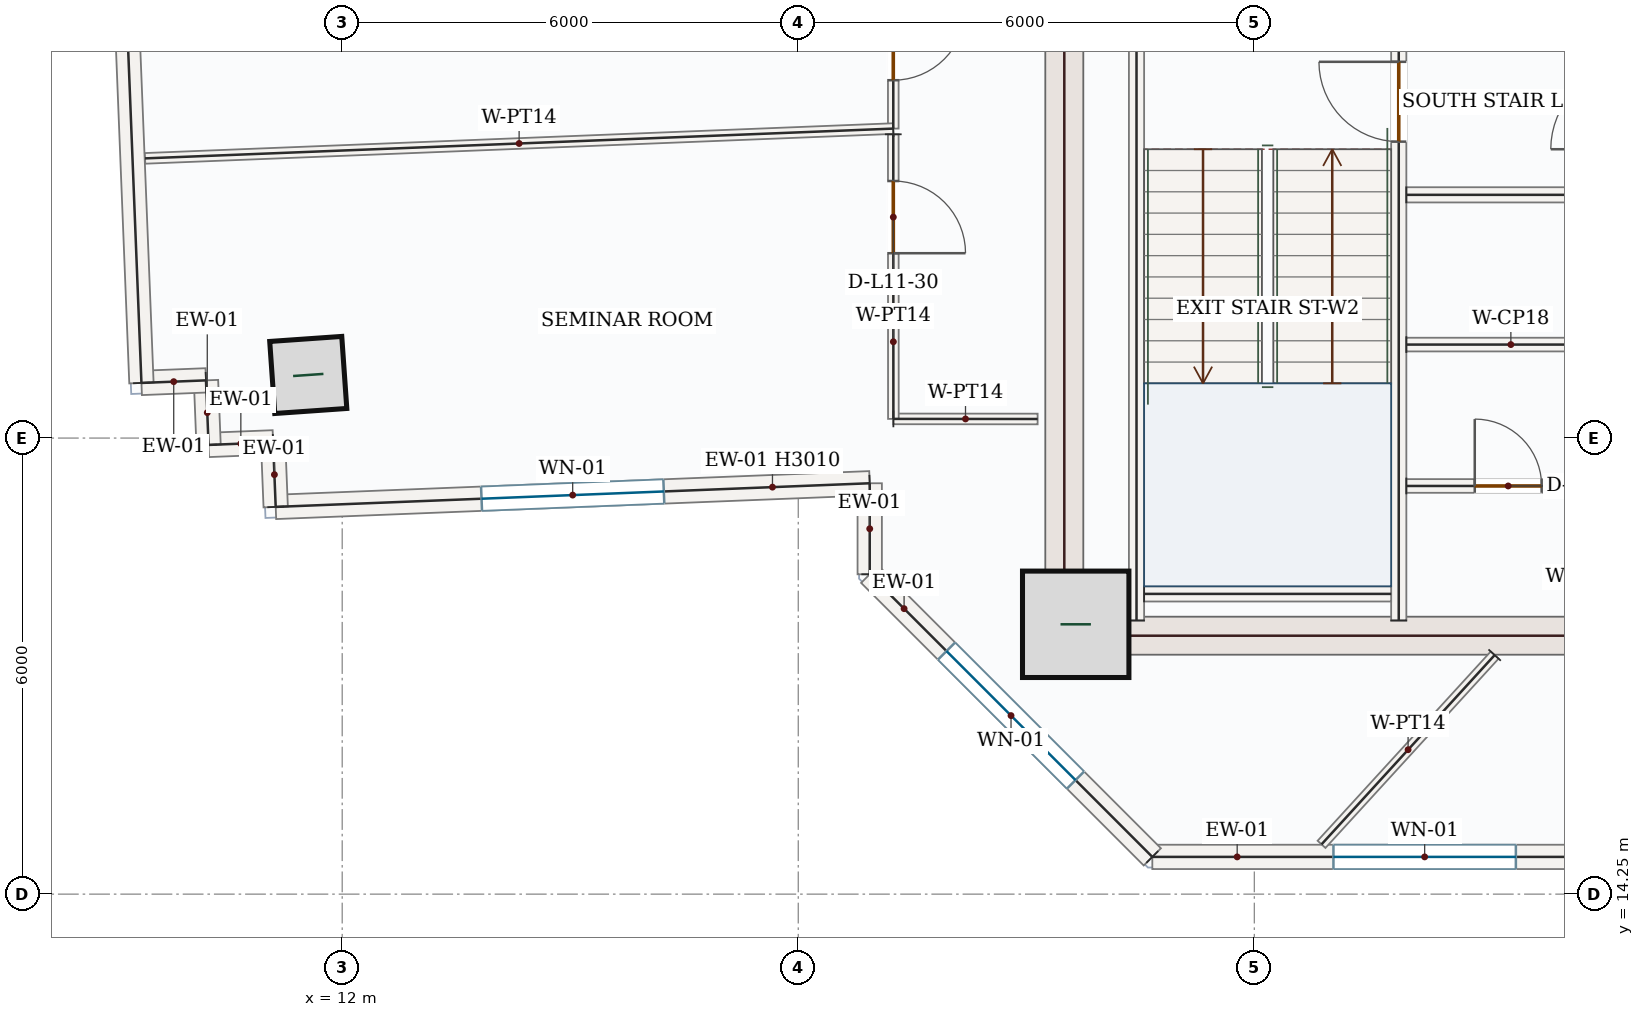
"""IFC4 building model, lengths in metres.
Left out: names, types, materials, properties, quantities, classifications, styles, units other than length and angle.
Written with IfcOpenShell. Run it as: python <this file> out.ifc"""

import sys

from ifc_helpers import new_model, si_unit, direction, frame, frame_2d, origin, origin_2d, place, context, subcontext, project, spatial, rectangle, hollow_rectangle, extrude, source, transform, mapped, element, fill, save


model = new_model("IFC4")
c1 = context("Model", 3, precision=1e-05, world=origin(), true_north=direction((0.0, 1.0)))
c2 = subcontext(c1, "Body", "Model", "MODEL_VIEW")
j1 = project(units=[si_unit("LENGTHUNIT", "METRE"), si_unit("PLANEANGLEUNIT", "RADIAN")], contexts=[c1])
p1 = place(None, origin())
s1 = spatial("IfcSite", under=j1, at=p1, CompositionType="ELEMENT")
p2 = place(p1, origin())
s2 = spatial("IfcBuilding", under=s1, at=p2, CompositionType="ELEMENT")
p3 = place(p2, frame((0.0, 0.0, 54.3)))
s3 = spatial("IfcBuildingStorey", under=s2, at=p3, CompositionType="ELEMENT", Elevation=54.3)
m1 = source(origin(), c2, "Body", "SweptSolid", [
    extrude(rectangle(XDim=8.55, YDim=0.5, at=frame_2d((4.275, 0.0))), origin(), (0.0, 0.0, 1.0), 3.95),
])
p4 = place(p3, frame((21.5, 17.4, 0.0), z_axis=(0.0, 0.0, 1.0), x_axis=(0.0, 1.0, 0.0)))
e1 = element("IfcWall", 1, at=p4, inside=s3, PredefinedType="SHEAR", context=c2, shape_type="MappedRepresentation", body=[
    mapped(m1, transform((0.0, 0.0, 0.0), x_axis=(1.0, 0.0, 0.0), y_axis=(0.0, 1.0, 0.0), z_axis=(0.0, 0.0, 1.0), scale=1.0)),
])
m2 = source(origin(), c2, "Body", "SweptSolid", [
    extrude(rectangle(XDim=7.0, YDim=0.5, at=frame_2d((3.5, 0.0))), origin(), (0.0, 0.0, 1.0), 3.95),
])
p5 = place(p3, frame((21.75, 17.65, 0.0), z_axis=(0.0, 0.0, 1.0), x_axis=(1.0, 0.0, 0.0)))
e2 = element("IfcWall", 2, at=p5, inside=s3, PredefinedType="SHEAR", context=c2, shape_type="MappedRepresentation", body=[
    mapped(m2, transform((0.0, 0.0, 0.0), x_axis=(1.0, 0.0, 0.0), y_axis=(0.0, 1.0, 0.0), z_axis=(0.0, 0.0, 1.0), scale=1.0)),
])
m3 = source(origin(), c2, "Body", "SweptSolid", [
    extrude(rectangle(XDim=1.4, YDim=1.4, at=origin_2d()), origin(), (0.0, 0.0, 1.0), 4.2),
])
p6 = place(p3, frame((21.65, 17.8, 0.0), z_axis=(0.0, 0.0, 1.0), x_axis=(1.0, 0.0, 0.0)))
e3 = element("IfcColumn", 3, at=p6, inside=s3, PredefinedType="COLUMN", context=c2, shape_type="MappedRepresentation", body=[
    mapped(m3, transform((0.0, 0.0, 0.0), x_axis=(1.0, 0.0, 0.0), y_axis=(0.0, 1.0, 0.0), z_axis=(0.0, 0.0, 1.0), scale=1.0)),
])
m4 = source(origin(), c2, "Body", "SweptSolid", [
    extrude(hollow_rectangle(XDim=0.95, YDim=0.95, WallThickness=0.05, at=origin_2d()), origin(), (0.0, 0.0, 1.0), 4.2),
])
p7 = place(p3, frame((11.553, 21.08, 0.0), z_axis=(0.0, 0.0, 1.0), x_axis=(0.99756405026, 0.069756473744, 0.0)))
e4 = element("IfcColumn", 4, at=p7, inside=s3, PredefinedType="COLUMN", context=c2, shape_type="MappedRepresentation", body=[
    mapped(m4, transform((0.0, 0.0, 0.0), x_axis=(1.0, 0.0, 0.0), y_axis=(0.0, 1.0, 0.0), z_axis=(0.0, 0.0, 1.0), scale=1.0)),
])
p8 = place(p3, frame((29.823, 14.74, 0.0), z_axis=(0.0, 0.0, 1.0), x_axis=(-1.0, 0.0, 0.0)))
e5 = element("IfcWall", 5, at=p8, inside=s3, PredefinedType="SOLIDWALL", context=c2, shape_type="SweptSolid", body=[
    extrude(rectangle(XDim=7.165, YDim=0.32, at=frame_2d((3.583, 0.0))), origin(), (0.0, 0.0, 1.0), 3.95),
])
p9 = place(p8, frame((2.382, 0.0, 0.85)))
e6 = element("IfcOpeningElement", 6, at=p9, cuts=e5, PredefinedType="OPENING", context=c2, shape_type="SweptSolid", body=[
    extrude(rectangle(XDim=2.4, YDim=1.8, at=frame_2d((1.2, 0.9))), frame((0.0, 0.17, 0.0), z_axis=(0.0, -1.0, 0.0), x_axis=(1.0, 0.0, 0.0)), (0.0, 0.0, 1.0), 0.34),
])
p10 = place(p3, frame((22.658, 14.74, 0.0), z_axis=(0.0, 0.0, 1.0), x_axis=(-0.707106781187, 0.707106781187, 0.0)))
e7 = element("IfcWall", 7, at=p10, inside=s3, PredefinedType="SOLIDWALL", context=c2, shape_type="SweptSolid", body=[
    extrude(rectangle(XDim=5.258, YDim=0.32, at=frame_2d((2.629, 0.0))), origin(), (0.0, 0.0, 1.0), 3.95),
])
p11 = place(p10, frame((1.429, 0.0, 0.85)))
e8 = element("IfcOpeningElement", 8, at=p11, cuts=e7, PredefinedType="OPENING", context=c2, shape_type="SweptSolid", body=[
    extrude(rectangle(XDim=2.4, YDim=1.8, at=frame_2d((1.2, 0.9))), frame((0.0, 0.17, 0.0), z_axis=(0.0, -1.0, 0.0), x_axis=(1.0, 0.0, 0.0)), (0.0, 0.0, 1.0), 0.34),
])
m5 = source(origin(), c2, "Body", "SweptSolid", [
    extrude(rectangle(XDim=1.198, YDim=0.32, at=frame_2d((0.599, 0.0))), origin(), (0.0, 0.0, 1.0), 3.95),
])
p12 = place(p3, frame((18.94, 18.458, 0.0), z_axis=(0.0, 0.0, 1.0), x_axis=(0.0, 1.0, 0.0)))
e9 = element("IfcWall", 9, at=p12, inside=s3, PredefinedType="SOLIDWALL", context=c2, shape_type="MappedRepresentation", body=[
    mapped(m5, transform((0.0, 0.0, 0.0), x_axis=(1.0, 0.0, 0.0), y_axis=(0.0, 1.0, 0.0), z_axis=(0.0, 0.0, 1.0), scale=1.0)),
])
p13 = place(p3, frame((18.94, 19.656, 0.0), z_axis=(0.0, 0.0, 1.0), x_axis=(-0.999208917222, -0.039768577336, 0.0)))
e10 = element("IfcWall", 10, at=p13, inside=s3, PredefinedType="SOLIDWALL", context=c2, shape_type="SweptSolid", body=[
    extrude(rectangle(XDim=7.821, YDim=0.32, at=frame_2d((3.911, 0.0))), origin(), (0.0, 0.0, 1.0), 3.01),
])
p14 = place(p13, frame((2.711, 0.0, 0.85)))
e11 = element("IfcOpeningElement", 11, at=p14, cuts=e10, PredefinedType="OPENING", context=c2, shape_type="SweptSolid", body=[
    extrude(rectangle(XDim=2.4, YDim=1.8, at=frame_2d((1.2, 0.9))), frame((0.0, 0.17, 0.0), z_axis=(0.0, -1.0, 0.0), x_axis=(1.0, 0.0, 0.0)), (0.0, 0.0, 1.0), 0.34),
])
m6 = source(origin(), c2, "Body", "SweptSolid", [
    extrude(rectangle(XDim=0.85, YDim=0.32, at=frame_2d((0.425, 0.0))), origin(), (0.0, 0.0, 1.0), 3.95),
])
p15 = place(p3, frame((11.125, 19.344, 0.0), z_axis=(0.0, 0.0, 1.0), x_axis=(-0.039933618331, 0.999202334929, 0.0)))
e12 = element("IfcWall", 12, at=p15, inside=s3, PredefinedType="SOLIDWALL", context=c2, shape_type="MappedRepresentation", body=[
    mapped(m6, transform((0.0, 0.0, 0.0), x_axis=(1.0, 0.0, 0.0), y_axis=(0.0, 1.0, 0.0), z_axis=(0.0, 0.0, 1.0), scale=1.0)),
])
m7 = source(origin(), c2, "Body", "SweptSolid", [
    extrude(rectangle(XDim=0.85, YDim=0.32, at=frame_2d((0.425, 0.0))), origin(), (0.0, 0.0, 1.0), 3.95),
])
for number, where, z_axis, x_axis in (
    (13, (11.091, 20.194, 0.0), (0.0, 0.0, 1.0), (-0.999, -0.04, 0.0)),
    (14, (10.242, 20.16, 0.0), (0.0, 0.0, 1.0), (-0.04, 0.999, 0.0)),
    (15, (10.208, 21.009, 0.0), (0.0, 0.0, 1.0), (-0.999, -0.04, 0.0)),
):
    element("IfcWall", number, at=place(p3, frame(where, z_axis=z_axis, x_axis=x_axis)), inside=s3, PredefinedType="SOLIDWALL", context=c2, shape_type="MappedRepresentation", body=[
        mapped(m7, transform((0.0, 0.0, 0.0), x_axis=(1.0, 0.0, 0.0), y_axis=(0.0, 1.0, 0.0), z_axis=(0.0, 0.0, 1.0), scale=1.0)),
    ])
m8 = source(origin(), c2, "Body", "SweptSolid", [
    extrude(rectangle(XDim=9.92, YDim=0.32, at=frame_2d((4.96, 0.0))), origin(), (0.0, 0.0, 1.0), 3.95),
])
p16 = place(p3, frame((9.359, 20.975, 0.0), z_axis=(0.0, 0.0, 1.0), x_axis=(-0.03977146366, 0.999208802342, 0.0)))
e16 = element("IfcWall", 16, at=p16, inside=s3, PredefinedType="SOLIDWALL", context=c2, shape_type="MappedRepresentation", body=[
    mapped(m8, transform((0.0, 0.0, 0.0), x_axis=(1.0, 0.0, 0.0), y_axis=(0.0, 1.0, 0.0), z_axis=(0.0, 0.0, 1.0), scale=1.0)),
])
m9 = source(origin(), c2, "Body", "SweptSolid", [
    extrude(rectangle(XDim=7.87, YDim=0.2, at=frame_2d((3.935, 0.0))), origin(), (0.0, 0.0, 1.0), 3.95),
])
p17 = place(p3, frame((22.45, 17.85, 0.0), z_axis=(0.0, 0.0, 1.0), x_axis=(0.0, 1.0, 0.0)))
e17 = element("IfcWall", 17, at=p17, inside=s3, PredefinedType="SOLIDWALL", context=c2, shape_type="MappedRepresentation", body=[
    mapped(m9, transform((0.0, 0.0, 0.0), x_axis=(1.0, 0.0, 0.0), y_axis=(0.0, 1.0, 0.0), z_axis=(0.0, 0.0, 1.0), scale=1.0)),
])
p18 = place(p3, frame((25.9, 17.85, 0.0), z_axis=(0.0, 0.0, 1.0), x_axis=(0.0, 1.0, 0.0)))
e18 = element("IfcWall", 18, at=p18, inside=s3, PredefinedType="SOLIDWALL", context=c2, shape_type="SweptSolid", body=[
    extrude(rectangle(XDim=8.0, YDim=0.2, at=frame_2d((4.0, 0.0))), origin(), (0.0, 0.0, 1.0), 3.95),
])
p19 = place(p18, frame((6.3, 0.0, 0.0)))
e19 = element("IfcOpeningElement", 19, at=p19, cuts=e18, PredefinedType="OPENING", context=c2, shape_type="SweptSolid", body=[
    extrude(rectangle(XDim=1.05, YDim=2.15, at=frame_2d((0.525, 1.075))), frame((0.0, 0.11, 0.0), z_axis=(0.0, -1.0, 0.0), x_axis=(1.0, 0.0, 0.0)), (0.0, 0.0, 1.0), 0.22),
])
m10 = source(origin(), c2, "Body", "SweptSolid", [
    extrude(rectangle(XDim=3.25, YDim=0.2, at=frame_2d((1.625, 0.0))), origin(), (0.0, 0.0, 1.0), 3.95),
])
p20 = place(p3, frame((22.55, 18.2, 0.0), z_axis=(0.0, 0.0, 1.0), x_axis=(1.0, 0.0, 0.0)))
e20 = element("IfcWall", 20, at=p20, inside=s3, PredefinedType="SOLIDWALL", context=c2, shape_type="MappedRepresentation", body=[
    mapped(m10, transform((0.0, 0.0, 0.0), x_axis=(1.0, 0.0, 0.0), y_axis=(0.0, 1.0, 0.0), z_axis=(0.0, 0.0, 1.0), scale=1.0)),
])
m11 = source(origin(), c2, "Body", "SweptSolid", [
    extrude(rectangle(XDim=2.75, YDim=0.2, at=frame_2d((1.375, 0.0))), origin(), (0.0, 0.0, 1.0), 3.95),
])
p21 = place(p3, frame((26.0, 23.45, 0.0), z_axis=(0.0, 0.0, 1.0), x_axis=(1.0, 0.0, 0.0)))
e21 = element("IfcWall", 21, at=p21, inside=s3, PredefinedType="SOLIDWALL", context=c2, shape_type="MappedRepresentation", body=[
    mapped(m11, transform((0.0, 0.0, 0.0), x_axis=(1.0, 0.0, 0.0), y_axis=(0.0, 1.0, 0.0), z_axis=(0.0, 0.0, 1.0), scale=1.0)),
])
p22 = place(p3, frame((26.0, 19.62, 0.0), z_axis=(0.0, 0.0, 1.0), x_axis=(1.0, 0.0, 0.0)))
e22 = element("IfcWall", 22, at=p22, inside=s3, PredefinedType="PARTITIONING", context=c2, shape_type="SweptSolid", body=[
    extrude(rectangle(XDim=2.75, YDim=0.18, at=frame_2d((1.375, 0.0))), origin(), (0.0, 0.0, 1.0), 3.95),
])
p23 = place(p22, frame((0.9, 0.0, 0.0)))
e23 = element("IfcOpeningElement", 23, at=p23, cuts=e22, PredefinedType="OPENING", context=c2, shape_type="SweptSolid", body=[
    extrude(rectangle(XDim=0.88, YDim=2.1, at=frame_2d((0.44, 1.05))), frame((0.0, 0.1, 0.0), z_axis=(0.0, -1.0, 0.0), x_axis=(1.0, 0.0, 0.0)), (0.0, 0.0, 1.0), 0.2),
])
m12 = source(origin(), c2, "Body", "SweptSolid", [
    extrude(rectangle(XDim=2.75, YDim=0.18, at=frame_2d((1.375, 0.0))), origin(), (0.0, 0.0, 1.0), 3.95),
])
p24 = place(p3, frame((26.0, 21.48, 0.0), z_axis=(0.0, 0.0, 1.0), x_axis=(1.0, 0.0, 0.0)))
e24 = element("IfcWall", 24, at=p24, inside=s3, PredefinedType="PARTITIONING", context=c2, shape_type="MappedRepresentation", body=[
    mapped(m12, transform((0.0, 0.0, 0.0), x_axis=(1.0, 0.0, 0.0), y_axis=(0.0, 1.0, 0.0), z_axis=(0.0, 0.0, 1.0), scale=1.0)),
])
p25 = place(p3, frame((19.25, 28.165, 0.0), z_axis=(0.0, 0.0, 1.0), x_axis=(0.0, -1.0, 0.0)))
e25 = element("IfcWall", 25, at=p25, inside=s3, PredefinedType="PARTITIONING", context=c2, shape_type="SweptSolid", body=[
    extrude(rectangle(XDim=3.843, YDim=0.14, at=frame_2d((1.921, 0.0))), origin(), (0.0, 0.0, 1.0), 3.95),
])
p26 = place(p25, frame((2.257, 0.0, 0.0)))
e26 = element("IfcOpeningElement", 26, at=p26, cuts=e25, PredefinedType="OPENING", context=c2, shape_type="SweptSolid", body=[
    extrude(rectangle(XDim=0.95, YDim=2.15, at=frame_2d((0.475, 1.075))), frame((0.0, 0.08, 0.0), z_axis=(0.0, -1.0, 0.0), x_axis=(1.0, 0.0, 0.0)), (0.0, 0.0, 1.0), 0.16),
])
m13 = source(origin(), c2, "Body", "SweptSolid", [
    extrude(rectangle(XDim=9.851, YDim=0.14, at=frame_2d((4.925, 0.0))), origin(), (0.0, 0.0, 1.0), 3.95),
])
p27 = place(p3, frame((19.249, 24.322, 0.0), z_axis=(0.0, 0.0, 1.0), x_axis=(-0.999208542072, -0.039778002084, 0.0)))
e27 = element("IfcWall", 27, at=p27, inside=s3, PredefinedType="PARTITIONING", context=c2, shape_type="MappedRepresentation", body=[
    mapped(m13, transform((0.0, 0.0, 0.0), x_axis=(1.0, 0.0, 0.0), y_axis=(0.0, 1.0, 0.0), z_axis=(0.0, 0.0, 1.0), scale=1.0)),
])
m14 = source(origin(), c2, "Body", "SweptSolid", [
    extrude(rectangle(XDim=1.898, YDim=0.14, at=frame_2d((0.949, 0.0))), origin(), (0.0, 0.0, 1.0), 3.95),
])
p28 = place(p3, frame((19.251, 20.502, 0.0), z_axis=(0.0, 0.0, 1.0), x_axis=(0.999999793113, -0.00064325215, 0.0)))
e28 = element("IfcWall", 28, at=p28, inside=s3, PredefinedType="PARTITIONING", context=c2, shape_type="MappedRepresentation", body=[
    mapped(m14, transform((0.0, 0.0, 0.0), x_axis=(1.0, 0.0, 0.0), y_axis=(0.0, 1.0, 0.0), z_axis=(0.0, 0.0, 1.0), scale=1.0)),
])
m15 = source(origin(), c2, "Body", "SweptSolid", [
    extrude(rectangle(XDim=3.375, YDim=0.14, at=frame_2d((1.688, 0.0))), origin(), (0.0, 0.0, 1.0), 3.95),
])
p29 = place(p3, frame((27.162, 17.395, 0.0), z_axis=(0.0, 0.0, 1.0), x_axis=(-0.674974079893, -0.737841440604, 0.0)))
e29 = element("IfcWall", 29, at=p29, inside=s3, PredefinedType="PARTITIONING", context=c2, shape_type="MappedRepresentation", body=[
    mapped(m15, transform((0.0, 0.0, 0.0), x_axis=(1.0, 0.0, 0.0), y_axis=(0.0, 1.0, 0.0), z_axis=(0.0, 0.0, 1.0), scale=1.0)),
])
p30 = place(p3, frame((19.25, 24.247, 0.0), z_axis=(0.0, 0.0, 1.0), x_axis=(0.000326008981, -0.999999946859, 0.0)))
e30 = element("IfcWall", 30, at=p30, inside=s3, PredefinedType="PARTITIONING", context=c2, shape_type="SweptSolid", body=[
    extrude(rectangle(XDim=3.744, YDim=0.14, at=frame_2d((1.872, 0.0))), origin(), (0.0, 0.0, 1.0), 3.95),
])
p31 = place(p30, frame((0.615, 0.0, 0.0)))
e31 = element("IfcOpeningElement", 31, at=p31, cuts=e30, PredefinedType="OPENING", context=c2, shape_type="SweptSolid", body=[
    extrude(rectangle(XDim=0.95, YDim=2.15, at=frame_2d((0.475, 1.075))), frame((0.0, 0.08, 0.0), z_axis=(0.0, -1.0, 0.0), x_axis=(1.0, 0.0, 0.0)), (0.0, 0.0, 1.0), 0.16),
])
m16 = source(origin(), c2, "Body", "SweptSolid", [
    extrude(rectangle(XDim=2.4, YDim=1.8, at=frame_2d((1.2, 0.9))), frame((0.0, 0.03, 0.0), z_axis=(0.0, -1.0, 0.0), x_axis=(1.0, 0.0, 0.0)), (0.0, 0.0, 1.0), 0.06),
])
p32 = place(p9, origin())
e32 = element("IfcWindow", 32, at=p32, inside=s3, PartitioningType="DOUBLE_PANEL_VERTICAL", PredefinedType="WINDOW", context=c2, shape_type="MappedRepresentation", body=[
    mapped(m16, transform((0.0, 0.0, 0.0), x_axis=(1.0, 0.0, 0.0), y_axis=(0.0, 1.0, 0.0), z_axis=(0.0, 0.0, 1.0), scale=1.0)),
])
fill(e6, e32)
p33 = place(p11, origin())
e33 = element("IfcWindow", 33, at=p33, inside=s3, PartitioningType="DOUBLE_PANEL_VERTICAL", PredefinedType="WINDOW", context=c2, shape_type="MappedRepresentation", body=[
    mapped(m16, transform((0.0, 0.0, 0.0), x_axis=(1.0, 0.0, 0.0), y_axis=(0.0, 1.0, 0.0), z_axis=(0.0, 0.0, 1.0), scale=1.0)),
])
fill(e8, e33)
p34 = place(p14, origin())
e34 = element("IfcWindow", 34, at=p34, inside=s3, PartitioningType="DOUBLE_PANEL_VERTICAL", PredefinedType="WINDOW", context=c2, shape_type="MappedRepresentation", body=[
    mapped(m16, transform((0.0, 0.0, 0.0), x_axis=(1.0, 0.0, 0.0), y_axis=(0.0, 1.0, 0.0), z_axis=(0.0, 0.0, 1.0), scale=1.0)),
])
fill(e11, e34)
m17 = source(origin(), c2, "Body", "SweptSolid", [
    extrude(rectangle(XDim=1.05, YDim=2.15, at=frame_2d((0.525, 1.075))), frame((0.0, 0.025, 0.0), z_axis=(0.0, -1.0, 0.0), x_axis=(1.0, 0.0, 0.0)), (0.0, 0.0, 1.0), 0.05),
])
p35 = place(p19, origin())
e35 = element("IfcDoor", 35, at=p35, inside=s3, OperationType="SINGLE_SWING_RIGHT", PredefinedType="DOOR", context=c2, shape_type="MappedRepresentation", body=[
    mapped(m17, transform((0.0, 0.0, 0.0), x_axis=(1.0, 0.0, 0.0), y_axis=(0.0, 1.0, 0.0), z_axis=(0.0, 0.0, 1.0), scale=1.0)),
])
fill(e19, e35)
m18 = source(origin(), c2, "Body", "SweptSolid", [
    extrude(rectangle(XDim=0.88, YDim=2.1, at=frame_2d((0.44, 1.05))), frame((0.0, 0.025, 0.0), z_axis=(0.0, -1.0, 0.0), x_axis=(1.0, 0.0, 0.0)), (0.0, 0.0, 1.0), 0.05),
])
p36 = place(p23, origin())
e36 = element("IfcDoor", 36, at=p36, inside=s3, OperationType="SINGLE_SWING_LEFT", PredefinedType="DOOR", context=c2, shape_type="MappedRepresentation", body=[
    mapped(m18, transform((0.0, 0.0, 0.0), x_axis=(1.0, 0.0, 0.0), y_axis=(0.0, 1.0, 0.0), z_axis=(0.0, 0.0, 1.0), scale=1.0)),
])
fill(e23, e36)
m19 = source(origin(), c2, "Body", "SweptSolid", [
    extrude(rectangle(XDim=0.95, YDim=2.15, at=frame_2d((0.475, 1.075))), frame((0.0, 0.025, 0.0), z_axis=(0.0, -1.0, 0.0), x_axis=(1.0, 0.0, 0.0)), (0.0, 0.0, 1.0), 0.05),
])
p37 = place(p26, origin())
e37 = element("IfcDoor", 37, at=p37, inside=s3, OperationType="SINGLE_SWING_LEFT", PredefinedType="DOOR", context=c2, shape_type="MappedRepresentation", body=[
    mapped(m19, transform((0.0, 0.0, 0.0), x_axis=(1.0, 0.0, 0.0), y_axis=(0.0, 1.0, 0.0), z_axis=(0.0, 0.0, 1.0), scale=1.0)),
])
fill(e26, e37)
p38 = place(p31, origin())
e38 = element("IfcDoor", 38, at=p38, inside=s3, OperationType="SINGLE_SWING_RIGHT", PredefinedType="DOOR", context=c2, shape_type="MappedRepresentation", body=[
    mapped(m19, transform((0.0, 0.0, 0.0), x_axis=(1.0, 0.0, 0.0), y_axis=(0.0, 1.0, 0.0), z_axis=(0.0, 0.0, 1.0), scale=1.0)),
])
fill(e31, e38)
save(model, sys.argv[1])
